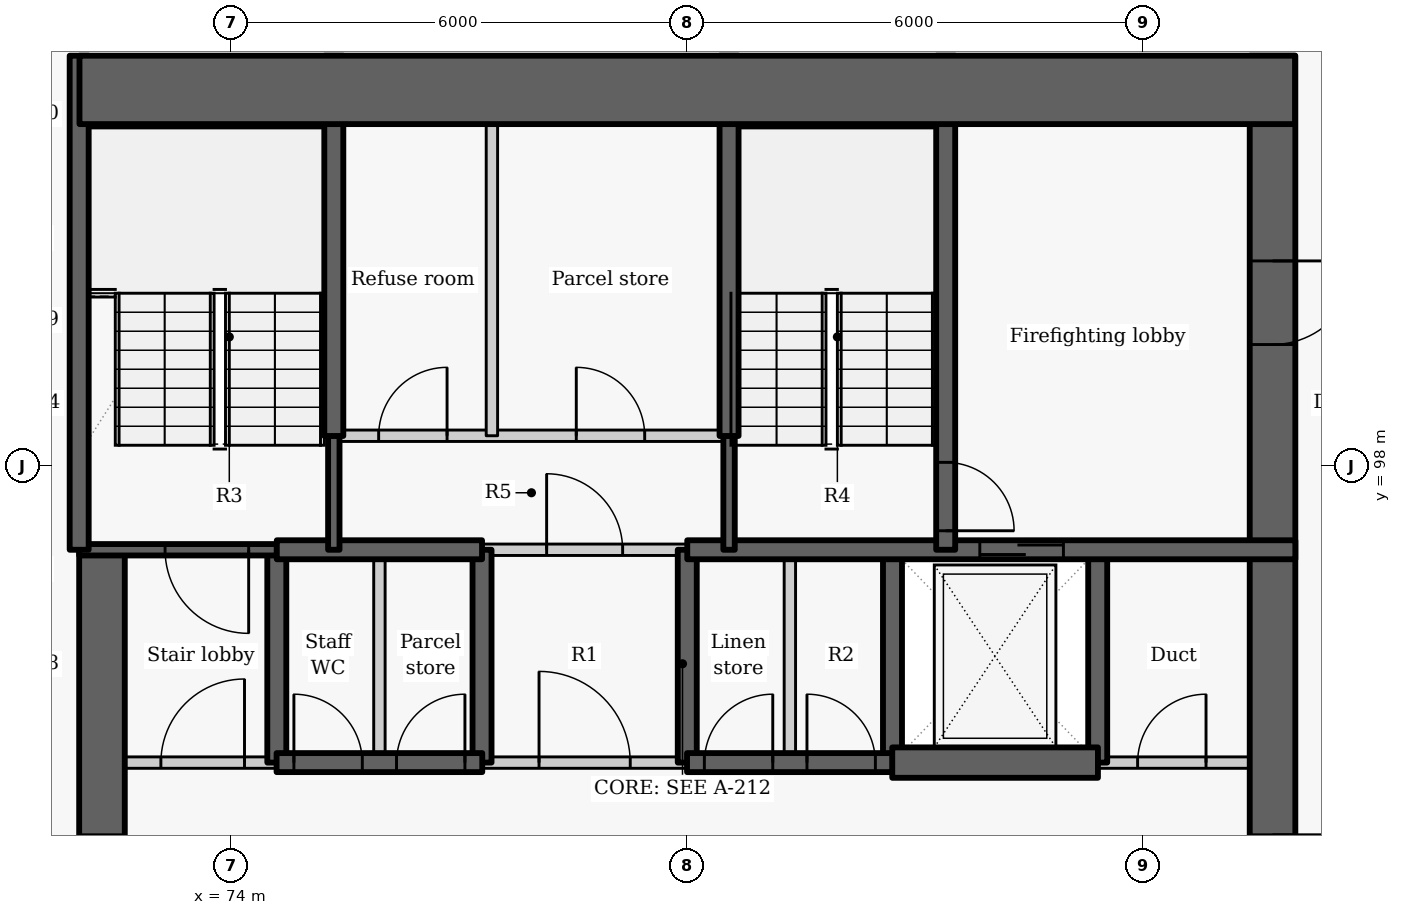
"""IFC4 building model, lengths in metres.
Left out: names, types, materials, properties, quantities, classifications, styles, units other than length and angle.
Written with IfcOpenShell. Run it as: python <this file> out.ifc"""

import sys

from ifc_helpers import new_model, si_unit, direction, frame, frame_2d, origin, place, context, subcontext, project, spatial, rectangle, extrude, element, fill, save


model = new_model("IFC4")
c1 = context("Model", 3, precision=1e-05, world=origin(), true_north=direction((0.0, 1.0)))
c2 = subcontext(c1, "Body", "Model", "MODEL_VIEW")
j1 = project(units=[si_unit("LENGTHUNIT", "METRE"), si_unit("PLANEANGLEUNIT", "RADIAN")], contexts=[c1])
p1 = place(None, origin())
s1 = spatial("IfcSite", under=j1, at=p1, CompositionType="ELEMENT")
p2 = place(p1, origin())
s2 = spatial("IfcBuilding", under=s1, at=p2, CompositionType="ELEMENT")
p3 = place(p2, frame((0.0, 0.0, 51.3)))
s3 = spatial("IfcBuildingStorey", under=s2, at=p3, CompositionType="ELEMENT", Elevation=51.3)
p4 = place(p3, frame((74.6, 94.1, -0.275), z_axis=(0.0, 0.0, 1.0), x_axis=(0.0, 1.0, 0.0)))
e1 = element("IfcWall", 1, at=p4, inside=s3, PredefinedType="SHEAR", context=c2, shape_type="SweptSolid", body=[
    extrude(rectangle(XDim=2.8, YDim=0.25, at=frame_2d((1.4, 0.0))), origin(), (0.0, 0.0, 1.0), 3.3),
])
p5 = place(p3, frame((72.3, 87.8, -0.275), z_axis=(0.0, 0.0, 1.0), x_axis=(0.0, 1.0, 0.0)))
e2 = element("IfcWall", 2, at=p5, inside=s3, PredefinedType="SHEAR", context=c2, shape_type="SweptSolid", body=[
    extrude(rectangle(XDim=9.1, YDim=0.6, at=frame_2d((4.55, 0.0))), origin(), (0.0, 0.0, 1.0), 3.3),
])
p6 = place(p5, frame((3.85, 0.0, 0.275)))
e3 = element("IfcOpeningElement", 3, at=p6, cuts=e2, PredefinedType="OPENING", context=c2, shape_type="SweptSolid", body=[
    extrude(rectangle(XDim=1.5, YDim=2.1, at=frame_2d((0.75, 1.05))), frame((0.0, 0.31, 0.0), z_axis=(0.0, -1.0, 0.0), x_axis=(1.0, 0.0, 0.0)), (0.0, 0.0, 1.0), 0.62),
])
for number, where, z_axis, x_axis in (
    (4, (77.3, 94.1, -0.275), (0.0, 0.0, 1.0), (0.0, 1.0, 0.0)),
    (5, (80.0, 94.1, -0.275), (0.0, 0.0, 1.0), (0.0, 1.0, 0.0)),
    (6, (82.7, 94.1, -0.275), (0.0, 0.0, 1.0), (0.0, 1.0, 0.0)),
    (7, (85.4, 94.1, -0.275), (0.0, 0.0, 1.0), (0.0, 1.0, 0.0)),
):
    element("IfcWall", number, at=place(p3, frame(where, z_axis=z_axis, x_axis=x_axis)), inside=s3, PredefinedType="SHEAR", context=c2, shape_type="SweptSolid", body=[
        extrude(rectangle(XDim=2.8, YDim=0.25, at=frame_2d((1.4, 0.0))), origin(), (0.0, 0.0, 1.0), 3.3),
    ])
p7 = place(p3, frame((87.7, 103.4, -0.275), z_axis=(0.0, 0.0, 1.0), x_axis=(0.0, -1.0, 0.0)))
e8 = element("IfcWall", 8, at=p7, inside=s3, PredefinedType="SHEAR", context=c2, shape_type="SweptSolid", body=[
    extrude(rectangle(XDim=15.6, YDim=0.6, at=frame_2d((7.8, 0.0))), origin(), (0.0, 0.0, 1.0), 3.3),
])
p8 = place(p7, frame((10.25, 0.0, 0.275)))
e9 = element("IfcOpeningElement", 9, at=p8, cuts=e8, PredefinedType="OPENING", context=c2, shape_type="SweptSolid", body=[
    extrude(rectangle(XDim=1.5, YDim=2.1, at=frame_2d((0.75, 1.05))), frame((0.0, 0.31, 0.0), z_axis=(0.0, -1.0, 0.0), x_axis=(1.0, 0.0, 0.0)), (0.0, 0.0, 1.0), 0.62),
])
p9 = place(p7, frame((2.7, 0.0, 0.275)))
e10 = element("IfcOpeningElement", 10, at=p9, cuts=e8, PredefinedType="OPENING", context=c2, shape_type="SweptSolid", body=[
    extrude(rectangle(XDim=1.1, YDim=2.1, at=frame_2d((0.55, 1.05))), frame((0.0, 0.31, 0.0), z_axis=(0.0, -1.0, 0.0), x_axis=(1.0, 0.0, 0.0)), (0.0, 0.0, 1.0), 0.62),
])
p10 = place(p3, frame((72.0, 94.1, 0.0), z_axis=(0.0, 0.0, 1.0), x_axis=(1.0, 0.0, 0.0)))
e11 = element("IfcWall", 11, at=p10, inside=s3, PredefinedType="PARTITIONING", context=c2, shape_type="SweptSolid", body=[
    extrude(rectangle(XDim=2.603, YDim=0.15, at=frame_2d((1.302, 0.0))), origin(), (0.0, 0.0, 1.0), 3.025),
])
p11 = place(p10, frame((1.075, 0.0, 0.0)))
e12 = element("IfcOpeningElement", 12, at=p11, cuts=e11, PredefinedType="OPENING", context=c2, shape_type="SweptSolid", body=[
    extrude(rectangle(XDim=1.1, YDim=2.1, at=frame_2d((0.55, 1.05))), frame((0.0, 0.085, 0.0), z_axis=(0.0, -1.0, 0.0), x_axis=(1.0, 0.0, 0.0)), (0.0, 0.0, 1.0), 0.17),
])
p12 = place(p3, frame((77.297, 94.1, 0.0), z_axis=(0.0, 0.0, 1.0), x_axis=(1.0, 0.0, 0.0)))
e13 = element("IfcWall", 13, at=p12, inside=s3, PredefinedType="PARTITIONING", context=c2, shape_type="SweptSolid", body=[
    extrude(rectangle(XDim=2.706, YDim=0.15, at=frame_2d((1.353, 0.0))), origin(), (0.0, 0.0, 1.0), 3.025),
])
p13 = place(p12, frame((0.753, 0.0, 0.0)))
e14 = element("IfcOpeningElement", 14, at=p13, cuts=e13, PredefinedType="OPENING", context=c2, shape_type="SweptSolid", body=[
    extrude(rectangle(XDim=1.2, YDim=2.1, at=frame_2d((0.6, 1.05))), frame((0.0, 0.085, 0.0), z_axis=(0.0, -1.0, 0.0), x_axis=(1.0, 0.0, 0.0)), (0.0, 0.0, 1.0), 0.17),
])
p14 = place(p3, frame((85.397, 94.1, 0.0), z_axis=(0.0, 0.0, 1.0), x_axis=(1.0, 0.0, 0.0)))
e15 = element("IfcWall", 15, at=p14, inside=s3, PredefinedType="PARTITIONING", context=c2, shape_type="SweptSolid", body=[
    extrude(rectangle(XDim=2.603, YDim=0.15, at=frame_2d((1.302, 0.0))), origin(), (0.0, 0.0, 1.0), 3.025),
])
p15 = place(p14, frame((0.528, 0.0, 0.0)))
e16 = element("IfcOpeningElement", 16, at=p15, cuts=e15, PredefinedType="OPENING", context=c2, shape_type="SweptSolid", body=[
    extrude(rectangle(XDim=0.9, YDim=2.1, at=frame_2d((0.45, 1.05))), frame((0.0, 0.085, 0.0), z_axis=(0.0, -1.0, 0.0), x_axis=(1.0, 0.0, 0.0)), (0.0, 0.0, 1.0), 0.17),
])
p16 = place(p3, frame((74.597, 94.1, -0.275), z_axis=(0.0, 0.0, 1.0), x_axis=(1.0, 0.0, 0.0)))
e17 = element("IfcWall", 17, at=p16, inside=s3, PredefinedType="SHEAR", context=c2, shape_type="SweptSolid", body=[
    extrude(rectangle(XDim=2.706, YDim=0.25, at=frame_2d((1.353, 0.0))), origin(), (0.0, 0.0, 1.0), 3.3),
])
p17 = place(p16, frame((0.228, 0.0, 0.275)))
e18 = element("IfcOpeningElement", 18, at=p17, cuts=e17, PredefinedType="OPENING", context=c2, shape_type="SweptSolid", body=[
    extrude(rectangle(XDim=0.9, YDim=2.1, at=frame_2d((0.45, 1.05))), frame((0.0, 0.135, 0.0), z_axis=(0.0, -1.0, 0.0), x_axis=(1.0, 0.0, 0.0)), (0.0, 0.0, 1.0), 0.27),
])
p18 = place(p16, frame((1.578, 0.0, 0.275)))
e19 = element("IfcOpeningElement", 19, at=p18, cuts=e17, PredefinedType="OPENING", context=c2, shape_type="SweptSolid", body=[
    extrude(rectangle(XDim=0.9, YDim=2.1, at=frame_2d((0.45, 1.05))), frame((0.0, 0.135, 0.0), z_axis=(0.0, -1.0, 0.0), x_axis=(1.0, 0.0, 0.0)), (0.0, 0.0, 1.0), 0.27),
])
p19 = place(p3, frame((79.997, 94.1, -0.275), z_axis=(0.0, 0.0, 1.0), x_axis=(1.0, 0.0, 0.0)))
e20 = element("IfcWall", 20, at=p19, inside=s3, PredefinedType="SHEAR", context=c2, shape_type="SweptSolid", body=[
    extrude(rectangle(XDim=2.706, YDim=0.25, at=frame_2d((1.353, 0.0))), origin(), (0.0, 0.0, 1.0), 3.3),
])
p20 = place(p19, frame((0.228, 0.0, 0.275)))
e21 = element("IfcOpeningElement", 21, at=p20, cuts=e20, PredefinedType="OPENING", context=c2, shape_type="SweptSolid", body=[
    extrude(rectangle(XDim=0.9, YDim=2.1, at=frame_2d((0.45, 1.05))), frame((0.0, 0.135, 0.0), z_axis=(0.0, -1.0, 0.0), x_axis=(1.0, 0.0, 0.0)), (0.0, 0.0, 1.0), 0.27),
])
p21 = place(p19, frame((1.578, 0.0, 0.275)))
e22 = element("IfcOpeningElement", 22, at=p21, cuts=e20, PredefinedType="OPENING", context=c2, shape_type="SweptSolid", body=[
    extrude(rectangle(XDim=0.9, YDim=2.1, at=frame_2d((0.45, 1.05))), frame((0.0, 0.135, 0.0), z_axis=(0.0, -1.0, 0.0), x_axis=(1.0, 0.0, 0.0)), (0.0, 0.0, 1.0), 0.27),
])
p22 = place(p3, frame((82.697, 94.1, -0.275), z_axis=(0.0, 0.0, 1.0), x_axis=(1.0, 0.0, 0.0)))
e23 = element("IfcWall", 23, at=p22, inside=s3, PredefinedType="SHEAR", context=c2, shape_type="SweptSolid", body=[
    extrude(rectangle(XDim=2.706, YDim=0.4, at=frame_2d((1.353, 0.0))), origin(), (0.0, 0.0, 1.0), 3.3),
])
p23 = place(p3, frame((74.6, 96.9, -0.275), z_axis=(0.0, 0.0, 1.0), x_axis=(-1.0, 0.0, 0.0)))
e24 = element("IfcWall", 24, at=p23, inside=s3, PredefinedType="SHEAR", context=c2, shape_type="SweptSolid", body=[
    extrude(rectangle(XDim=2.6, YDim=0.15, at=frame_2d((1.3, 0.0))), origin(), (0.0, 0.0, 1.0), 3.3),
])
p24 = place(p23, frame((0.37, 0.0, 0.275)))
e25 = element("IfcOpeningElement", 25, at=p24, cuts=e24, PredefinedType="OPENING", context=c2, shape_type="SweptSolid", body=[
    extrude(rectangle(XDim=1.1, YDim=2.1, at=frame_2d((0.55, 1.05))), frame((0.0, 0.085, 0.0), z_axis=(0.0, -1.0, 0.0), x_axis=(1.0, 0.0, 0.0)), (0.0, 0.0, 1.0), 0.17),
])
p25 = place(p3, frame((75.95, 94.1, 0.0), z_axis=(0.0, 0.0, 1.0), x_axis=(0.0, 1.0, 0.0)))
e26 = element("IfcWall", 26, at=p25, inside=s3, PredefinedType="PARTITIONING", context=c2, shape_type="SweptSolid", body=[
    extrude(rectangle(XDim=2.8, YDim=0.15, at=frame_2d((1.4, 0.0))), origin(), (0.0, 0.0, 1.0), 3.025),
])
p26 = place(p3, frame((74.6, 96.9, -0.275), z_axis=(0.0, 0.0, 1.0), x_axis=(1.0, 0.0, 0.0)))
e27 = element("IfcWall", 27, at=p26, inside=s3, PredefinedType="SHEAR", context=c2, shape_type="SweptSolid", body=[
    extrude(rectangle(XDim=2.7, YDim=0.25, at=frame_2d((1.35, 0.0))), origin(), (0.0, 0.0, 1.0), 3.3),
])
p27 = place(p3, frame((80.0, 96.9, -0.275), z_axis=(0.0, 0.0, 1.0), x_axis=(1.0, 0.0, 0.0)))
e28 = element("IfcWall", 28, at=p27, inside=s3, PredefinedType="SHEAR", context=c2, shape_type="SweptSolid", body=[
    extrude(rectangle(XDim=8.0, YDim=0.25, at=frame_2d((4.0, 0.0))), origin(), (0.0, 0.0, 1.0), 3.3),
])
p28 = place(p27, frame((3.849, 0.0, 0.275)))
e29 = element("IfcOpeningElement", 29, at=p28, cuts=e28, PredefinedType="OPENING", context=c2, shape_type="SweptSolid", body=[
    extrude(rectangle(XDim=1.1, YDim=2.1, at=frame_2d((0.55, 1.05))), frame((0.0, 0.135, 0.0), z_axis=(0.0, -1.0, 0.0), x_axis=(1.0, 0.0, 0.0)), (0.0, 0.0, 1.0), 0.27),
])
p29 = place(p3, frame((77.3, 96.9, 0.0), z_axis=(0.0, 0.0, 1.0), x_axis=(1.0, 0.0, 0.0)))
e30 = element("IfcWall", 30, at=p29, inside=s3, PredefinedType="PARTITIONING", context=c2, shape_type="SweptSolid", body=[
    extrude(rectangle(XDim=2.7, YDim=0.15, at=frame_2d((1.35, 0.0))), origin(), (0.0, 0.0, 1.0), 3.025),
])
p30 = place(p29, frame((0.85, 0.0, 0.0)))
e31 = element("IfcOpeningElement", 31, at=p30, cuts=e30, PredefinedType="OPENING", context=c2, shape_type="SweptSolid", body=[
    extrude(rectangle(XDim=1.0, YDim=2.1, at=frame_2d((0.5, 1.05))), frame((0.0, 0.085, 0.0), z_axis=(0.0, -1.0, 0.0), x_axis=(1.0, 0.0, 0.0)), (0.0, 0.0, 1.0), 0.17),
])
p31 = place(p3, frame((81.35, 94.1, 0.0), z_axis=(0.0, 0.0, 1.0), x_axis=(0.0, 1.0, 0.0)))
e32 = element("IfcWall", 32, at=p31, inside=s3, PredefinedType="PARTITIONING", context=c2, shape_type="SweptSolid", body=[
    extrude(rectangle(XDim=2.8, YDim=0.15, at=frame_2d((1.4, 0.0))), origin(), (0.0, 0.0, 1.0), 3.025),
])
p32 = place(p3, frame((75.35, 96.9, -0.275), z_axis=(0.0, 0.0, 1.0), x_axis=(0.0, 1.0, 0.0)))
e33 = element("IfcWall", 33, at=p32, inside=s3, PredefinedType="SHEAR", context=c2, shape_type="SweptSolid", body=[
    extrude(rectangle(XDim=1.503, YDim=0.15, at=frame_2d((0.751, 0.0))), origin(), (0.0, 0.0, 1.0), 3.3),
])
p33 = place(p3, frame((75.35, 98.397, -0.275), z_axis=(0.0, 0.0, 1.0), x_axis=(0.0, 1.0, 0.0)))
e34 = element("IfcWall", 34, at=p33, inside=s3, PredefinedType="SHEAR", context=c2, shape_type="SweptSolid", body=[
    extrude(rectangle(XDim=5.003, YDim=0.25, at=frame_2d((2.501, 0.0))), origin(), (0.0, 0.0, 1.0), 3.3),
])
p34 = place(p3, frame((72.0, 96.9, -0.275), z_axis=(0.0, 0.0, 1.0), x_axis=(0.0, 1.0, 0.0)))
e35 = element("IfcWall", 35, at=p34, inside=s3, PredefinedType="SHEAR", context=c2, shape_type="SweptSolid", body=[
    extrude(rectangle(XDim=6.5, YDim=0.25, at=frame_2d((3.25, 0.0))), origin(), (0.0, 0.0, 1.0), 3.3),
])
p35 = place(p3, frame((83.4, 103.4, -0.275), z_axis=(0.0, 0.0, 1.0), x_axis=(0.0, -1.0, 0.0)))
e36 = element("IfcWall", 36, at=p35, inside=s3, PredefinedType="SHEAR", context=c2, shape_type="SweptSolid", body=[
    extrude(rectangle(XDim=6.5, YDim=0.25, at=frame_2d((3.25, 0.0))), origin(), (0.0, 0.0, 1.0), 3.3),
])
p36 = place(p35, frame((5.35, 0.0, 0.275)))
e37 = element("IfcOpeningElement", 37, at=p36, cuts=e36, PredefinedType="OPENING", context=c2, shape_type="SweptSolid", body=[
    extrude(rectangle(XDim=0.9, YDim=2.1, at=frame_2d((0.45, 1.05))), frame((0.0, 0.135, 0.0), z_axis=(0.0, -1.0, 0.0), x_axis=(1.0, 0.0, 0.0)), (0.0, 0.0, 1.0), 0.27),
])
p37 = place(p3, frame((80.55, 96.9, -0.275), z_axis=(0.0, 0.0, 1.0), x_axis=(0.0, 1.0, 0.0)))
e38 = element("IfcWall", 38, at=p37, inside=s3, PredefinedType="SHEAR", context=c2, shape_type="SweptSolid", body=[
    extrude(rectangle(XDim=1.503, YDim=0.15, at=frame_2d((0.751, 0.0))), origin(), (0.0, 0.0, 1.0), 3.3),
])
p38 = place(p3, frame((80.55, 98.397, -0.275), z_axis=(0.0, 0.0, 1.0), x_axis=(0.0, 1.0, 0.0)))
e39 = element("IfcWall", 39, at=p38, inside=s3, PredefinedType="SHEAR", context=c2, shape_type="SweptSolid", body=[
    extrude(rectangle(XDim=5.003, YDim=0.25, at=frame_2d((2.501, 0.0))), origin(), (0.0, 0.0, 1.0), 3.3),
])
p39 = place(p3, frame((75.35, 98.4, 0.0), z_axis=(0.0, 0.0, 1.0), x_axis=(1.0, 0.0, 0.0)))
e40 = element("IfcWall", 40, at=p39, inside=s3, PredefinedType="PARTITIONING", context=c2, shape_type="SweptSolid", body=[
    extrude(rectangle(XDim=5.2, YDim=0.15, at=frame_2d((2.6, 0.0))), origin(), (0.0, 0.0, 1.0), 3.025),
])
p40 = place(p39, frame((0.59, 0.0, 0.0)))
e41 = element("IfcOpeningElement", 41, at=p40, cuts=e40, PredefinedType="OPENING", context=c2, shape_type="SweptSolid", body=[
    extrude(rectangle(XDim=0.9, YDim=2.1, at=frame_2d((0.45, 1.05))), frame((0.0, 0.085, 0.0), z_axis=(0.0, -1.0, 0.0), x_axis=(1.0, 0.0, 0.0)), (0.0, 0.0, 1.0), 0.17),
])
p41 = place(p39, frame((3.19, 0.0, 0.0)))
e42 = element("IfcOpeningElement", 42, at=p41, cuts=e40, PredefinedType="OPENING", context=c2, shape_type="SweptSolid", body=[
    extrude(rectangle(XDim=0.9, YDim=2.1, at=frame_2d((0.45, 1.05))), frame((0.0, 0.085, 0.0), z_axis=(0.0, -1.0, 0.0), x_axis=(1.0, 0.0, 0.0)), (0.0, 0.0, 1.0), 0.17),
])
p42 = place(p3, frame((77.43, 98.4, 0.0), z_axis=(0.0, 0.0, 1.0), x_axis=(0.0, 1.0, 0.0)))
e43 = element("IfcWall", 43, at=p42, inside=s3, PredefinedType="PARTITIONING", context=c2, shape_type="SweptSolid", body=[
    extrude(rectangle(XDim=5.0, YDim=0.15, at=frame_2d((2.5, 0.0))), origin(), (0.0, 0.0, 1.0), 3.025),
])
p43 = place(p3, frame((72.004, 102.95, -0.275), z_axis=(0.0, 0.0, 1.0), x_axis=(1.0, 0.0, 0.0)))
e44 = element("IfcWall", 44, at=p43, inside=s3, PredefinedType="SHEAR", context=c2, shape_type="SweptSolid", body=[
    extrude(rectangle(XDim=15.992, YDim=0.9, at=frame_2d((7.996, 0.0))), origin(), (0.0, 0.0, 1.0), 3.3),
])
p44 = place(p11, origin())
e45 = element("IfcDoor", 45, at=p44, inside=s3, OperationType="SINGLE_SWING_RIGHT", PredefinedType="DOOR", context=c2, shape_type="SweptSolid", body=[
    extrude(rectangle(XDim=1.1, YDim=2.1, at=frame_2d((0.55, 1.05))), frame((0.0, 0.025, 0.0), z_axis=(0.0, -1.0, 0.0), x_axis=(1.0, 0.0, 0.0)), (0.0, 0.0, 1.0), 0.05),
])
fill(e12, e45)
p45 = place(p17, origin())
e46 = element("IfcDoor", 46, at=p45, inside=s3, OperationType="SINGLE_SWING_LEFT", PredefinedType="DOOR", context=c2, shape_type="SweptSolid", body=[
    extrude(rectangle(XDim=0.9, YDim=2.1, at=frame_2d((0.45, 1.05))), frame((0.0, 0.025, 0.0), z_axis=(0.0, -1.0, 0.0), x_axis=(1.0, 0.0, 0.0)), (0.0, 0.0, 1.0), 0.05),
])
fill(e18, e46)
p46 = place(p18, origin())
e47 = element("IfcDoor", 47, at=p46, inside=s3, OperationType="SINGLE_SWING_RIGHT", PredefinedType="DOOR", context=c2, shape_type="SweptSolid", body=[
    extrude(rectangle(XDim=0.9, YDim=2.1, at=frame_2d((0.45, 1.05))), frame((0.0, 0.025, 0.0), z_axis=(0.0, -1.0, 0.0), x_axis=(1.0, 0.0, 0.0)), (0.0, 0.0, 1.0), 0.05),
])
fill(e19, e47)
p47 = place(p13, origin())
e48 = element("IfcDoor", 48, at=p47, inside=s3, OperationType="DOUBLE_DOOR_SINGLE_SWING", PredefinedType="DOOR", context=c2, shape_type="SweptSolid", body=[
    extrude(rectangle(XDim=1.2, YDim=2.1, at=frame_2d((0.6, 1.05))), frame((0.0, 0.025, 0.0), z_axis=(0.0, -1.0, 0.0), x_axis=(1.0, 0.0, 0.0)), (0.0, 0.0, 1.0), 0.05),
])
fill(e14, e48)
p48 = place(p20, origin())
e49 = element("IfcDoor", 49, at=p48, inside=s3, OperationType="SINGLE_SWING_RIGHT", PredefinedType="DOOR", context=c2, shape_type="SweptSolid", body=[
    extrude(rectangle(XDim=0.9, YDim=2.1, at=frame_2d((0.45, 1.05))), frame((0.0, 0.025, 0.0), z_axis=(0.0, -1.0, 0.0), x_axis=(1.0, 0.0, 0.0)), (0.0, 0.0, 1.0), 0.05),
])
fill(e21, e49)
p49 = place(p21, origin())
e50 = element("IfcDoor", 50, at=p49, inside=s3, OperationType="SINGLE_SWING_LEFT", PredefinedType="DOOR", context=c2, shape_type="SweptSolid", body=[
    extrude(rectangle(XDim=0.9, YDim=2.1, at=frame_2d((0.45, 1.05))), frame((0.0, 0.025, 0.0), z_axis=(0.0, -1.0, 0.0), x_axis=(1.0, 0.0, 0.0)), (0.0, 0.0, 1.0), 0.05),
])
fill(e22, e50)
p50 = place(p28, origin())
e51 = element("IfcDoor", 51, at=p50, inside=s3, OperationType="SLIDING_TO_LEFT", PredefinedType="DOOR", context=c2, shape_type="SweptSolid", body=[
    extrude(rectangle(XDim=1.1, YDim=2.1, at=frame_2d((0.55, 1.05))), frame((0.0, 0.025, 0.0), z_axis=(0.0, -1.0, 0.0), x_axis=(1.0, 0.0, 0.0)), (0.0, 0.0, 1.0), 0.05),
])
fill(e29, e51)
p51 = place(p15, origin())
e52 = element("IfcDoor", 52, at=p51, inside=s3, OperationType="SINGLE_SWING_RIGHT", PredefinedType="DOOR", context=c2, shape_type="SweptSolid", body=[
    extrude(rectangle(XDim=0.9, YDim=2.1, at=frame_2d((0.45, 1.05))), frame((0.0, 0.025, 0.0), z_axis=(0.0, -1.0, 0.0), x_axis=(1.0, 0.0, 0.0)), (0.0, 0.0, 1.0), 0.05),
])
fill(e16, e52)
p52 = place(p30, origin())
e53 = element("IfcDoor", 53, at=p52, inside=s3, OperationType="SINGLE_SWING_LEFT", PredefinedType="DOOR", context=c2, shape_type="SweptSolid", body=[
    extrude(rectangle(XDim=1.0, YDim=2.1, at=frame_2d((0.5, 1.05))), frame((0.0, 0.025, 0.0), z_axis=(0.0, -1.0, 0.0), x_axis=(1.0, 0.0, 0.0)), (0.0, 0.0, 1.0), 0.05),
])
fill(e31, e53)
p53 = place(p40, origin())
e54 = element("IfcDoor", 54, at=p53, inside=s3, OperationType="SINGLE_SWING_RIGHT", PredefinedType="DOOR", context=c2, shape_type="SweptSolid", body=[
    extrude(rectangle(XDim=0.9, YDim=2.1, at=frame_2d((0.45, 1.05))), frame((0.0, 0.025, 0.0), z_axis=(0.0, -1.0, 0.0), x_axis=(1.0, 0.0, 0.0)), (0.0, 0.0, 1.0), 0.05),
])
fill(e41, e54)
p54 = place(p41, origin())
e55 = element("IfcDoor", 55, at=p54, inside=s3, OperationType="SINGLE_SWING_LEFT", PredefinedType="DOOR", context=c2, shape_type="SweptSolid", body=[
    extrude(rectangle(XDim=0.9, YDim=2.1, at=frame_2d((0.45, 1.05))), frame((0.0, 0.025, 0.0), z_axis=(0.0, -1.0, 0.0), x_axis=(1.0, 0.0, 0.0)), (0.0, 0.0, 1.0), 0.05),
])
fill(e42, e55)
p55 = place(p24, origin())
e56 = element("IfcDoor", 56, at=p55, inside=s3, OperationType="SINGLE_SWING_LEFT", PredefinedType="DOOR", context=c2, shape_type="SweptSolid", body=[
    extrude(rectangle(XDim=1.1, YDim=2.1, at=frame_2d((0.55, 1.05))), frame((0.0, 0.025, 0.0), z_axis=(0.0, -1.0, 0.0), x_axis=(1.0, 0.0, 0.0)), (0.0, 0.0, 1.0), 0.05),
])
fill(e25, e56)
p56 = place(p36, origin())
e57 = element("IfcDoor", 57, at=p56, inside=s3, OperationType="SINGLE_SWING_RIGHT", PredefinedType="DOOR", context=c2, shape_type="SweptSolid", body=[
    extrude(rectangle(XDim=0.9, YDim=2.1, at=frame_2d((0.45, 1.05))), frame((0.0, 0.025, 0.0), z_axis=(0.0, -1.0, 0.0), x_axis=(1.0, 0.0, 0.0)), (0.0, 0.0, 1.0), 0.05),
])
fill(e37, e57)
p57 = place(p6, origin())
e58 = element("IfcDoor", 58, at=p57, inside=s3, OperationType="DOUBLE_DOOR_SINGLE_SWING", PredefinedType="DOOR", context=c2, shape_type="SweptSolid", body=[
    extrude(rectangle(XDim=1.5, YDim=2.1, at=frame_2d((0.75, 1.05))), frame((0.0, 0.025, 0.0), z_axis=(0.0, -1.0, 0.0), x_axis=(1.0, 0.0, 0.0)), (0.0, 0.0, 1.0), 0.05),
])
fill(e3, e58)
p58 = place(p9, origin())
e59 = element("IfcDoor", 59, at=p58, inside=s3, OperationType="SINGLE_SWING_LEFT", PredefinedType="DOOR", context=c2, shape_type="SweptSolid", body=[
    extrude(rectangle(XDim=1.1, YDim=2.1, at=frame_2d((0.55, 1.05))), frame((0.0, 0.025, 0.0), z_axis=(0.0, -1.0, 0.0), x_axis=(1.0, 0.0, 0.0)), (0.0, 0.0, 1.0), 0.05),
])
fill(e10, e59)
save(model, sys.argv[1])
